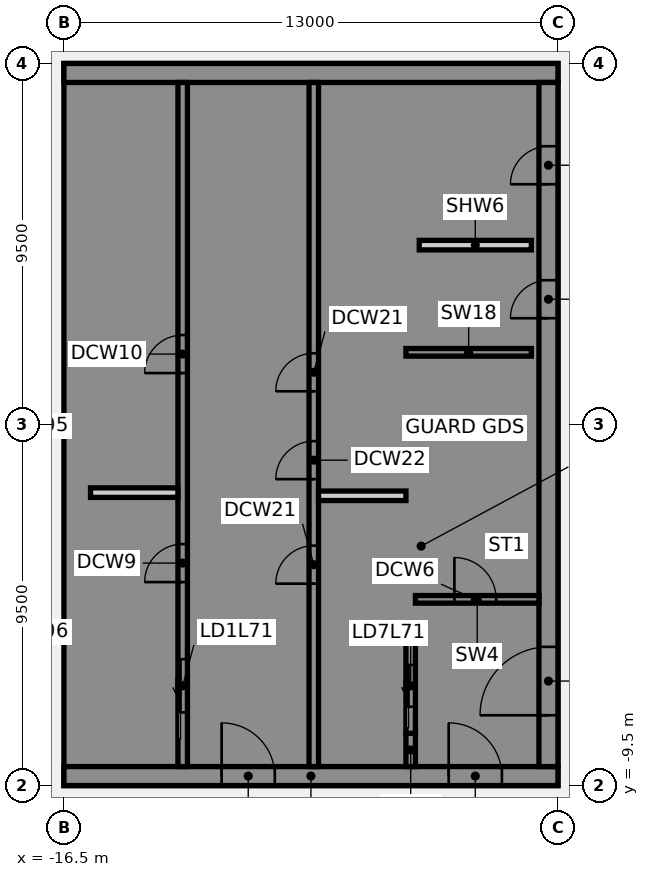
"""IFC4 building model, lengths in metres.
Left out: names, types, materials, properties, quantities, classifications, styles, units other than length and angle.
Written with IfcOpenShell. Run it as: python <this file> out.ifc"""

import sys

from ifc_helpers import new_model, si_unit, direction, frame, frame_2d, origin, place, context, subcontext, project, spatial, polyline, rectangle, outline, extrude, element, fill, save


model = new_model("IFC4")
c1 = context("Model", 3, precision=1e-05, world=origin(), true_north=direction((0.0, 1.0)))
c2 = subcontext(c1, "Body", "Model", "MODEL_VIEW")
j1 = project(units=[si_unit("LENGTHUNIT", "METRE"), si_unit("PLANEANGLEUNIT", "RADIAN")], contexts=[c1])
p1 = place(None, origin())
s1 = spatial("IfcSite", under=j1, at=p1, CompositionType="ELEMENT")
p2 = place(p1, origin())
s2 = spatial("IfcBuilding", under=s1, at=p2, CompositionType="ELEMENT")
p3 = place(p2, frame((0.0, 0.0, 278.4)))
s3 = spatial("IfcBuildingStorey", under=s2, at=p3, CompositionType="ELEMENT", Elevation=278.4)
p4 = place(p3, frame((-16.5, -9.25, 0.0), z_axis=(0.0, 0.0, 1.0), x_axis=(1.0, 0.0, 0.0)))
e1 = element("IfcWall", 1, at=p4, inside=s3, PredefinedType="SHEAR", context=c2, shape_type="SweptSolid", body=[
    extrude(rectangle(XDim=13.0, YDim=0.5, at=frame_2d((6.5, 0.0))), origin(), (0.0, 0.0, 1.0), 8.8),
])
p5 = place(p4, frame((4.15, 0.0, 0.0)))
e2 = element("IfcOpeningElement", 2, at=p5, cuts=e1, PredefinedType="OPENING", context=c2, shape_type="SweptSolid", body=[
    extrude(rectangle(XDim=1.4, YDim=2.1, at=frame_2d((0.7, 1.05))), frame((0.0, 0.26, 0.0), z_axis=(0.0, -1.0, 0.0), x_axis=(1.0, 0.0, 0.0)), (0.0, 0.0, 1.0), 0.52),
])
p6 = place(p4, frame((10.125, 0.0, 0.0)))
e3 = element("IfcOpeningElement", 3, at=p6, cuts=e1, PredefinedType="OPENING", context=c2, shape_type="SweptSolid", body=[
    extrude(rectangle(XDim=1.4, YDim=2.1, at=frame_2d((0.7, 1.05))), frame((0.0, 0.26, 0.0), z_axis=(0.0, -1.0, 0.0), x_axis=(1.0, 0.0, 0.0)), (0.0, 0.0, 1.0), 0.52),
])
p7 = place(p3, origin())
e4 = element("IfcWall", 4, at=p7, inside=s3, PredefinedType="SHEAR", context=c2, shape_type="SweptSolid", body=[
    extrude(outline(polyline([(-13.5, -8.125), (-16.0, -8.125), (-16.0, -5.625), (-13.5, -5.625), (-13.5, -5.375), (-16.0, -5.375), (-16.0, 5.375), (-13.5, 5.375), (-13.5, 5.625), (-16.0, 5.625), (-16.0, 8.125), (-13.5, 8.125), (-13.5, 9.0), (-16.0, 9.0), (-16.5, 9.0), (-16.5, -9.0), (-16.0, -9.0), (-13.5, -9.0), (-13.5, -8.125)])), origin(), (0.0, 0.0, 1.0), 8.8),
])
p8 = place(p3, frame((-16.5, 9.25, 0.0), z_axis=(0.0, 0.0, 1.0), x_axis=(1.0, 0.0, 0.0)))
e5 = element("IfcWall", 5, at=p8, inside=s3, PredefinedType="SHEAR", context=c2, shape_type="SweptSolid", body=[
    extrude(rectangle(XDim=13.0, YDim=0.5, at=frame_2d((6.5, 0.0))), origin(), (0.0, 0.0, 1.0), 8.8),
])
p9 = place(p3, origin())
e6 = element("IfcWall", 6, at=p9, inside=s3, PredefinedType="SHEAR", context=c2, shape_type="SweptSolid", body=[
    extrude(outline(polyline([(-9.8, -5.375), (-9.8, -5.625), (-7.5, -5.625), (-7.25, -5.625), (-7.25, 9.0), (-7.5, 9.0), (-9.8, 9.0), (-9.8, 8.125), (-7.5, 8.125), (-7.5, 5.625), (-9.8, 5.625), (-9.8, 5.375), (-7.5, 5.375), (-7.5, 2.875), (-9.8, 2.875), (-9.8, 2.625), (-7.5, 2.625), (-7.5, -5.375), (-9.8, -5.375)])), origin(), (0.0, 0.0, 1.0), 8.8),
])
p10 = place(p3, origin())
e7 = element("IfcWall", 7, at=p10, inside=s3, PredefinedType="SHEAR", context=c2, shape_type="SweptSolid", body=[
    extrude(outline(polyline([(-7.5, -8.125), (-9.55, -8.125), (-9.55, -5.625), (-9.8, -5.625), (-9.8, -8.125), (-9.8, -9.0), (-7.5, -9.0), (-7.5, -8.125)])), origin(), (0.0, 0.0, 1.0), 8.8),
])
p11 = place(p3, frame((-7.375, -9.0, 0.0), z_axis=(0.0, 0.0, 1.0), x_axis=(0.0, 1.0, 0.0)))
e8 = element("IfcWall", 8, at=p11, inside=s3, PredefinedType="SHEAR", context=c2, shape_type="SweptSolid", body=[
    extrude(rectangle(XDim=0.875, YDim=0.25, at=frame_2d((0.438, 0.0))), origin(), (0.0, 0.0, 1.0), 8.8),
])
p12 = place(p3, frame((-7.5, 1.9, 0.0), z_axis=(0.0, 0.0, 1.0), x_axis=(1.0, 0.0, 0.0)))
e9 = element("IfcWall", 9, at=p12, inside=s3, PredefinedType="SHEAR", context=c2, shape_type="SweptSolid", body=[
    extrude(rectangle(XDim=3.3, YDim=0.2, at=frame_2d((1.65, 0.0))), origin(), (0.0, 0.0, 1.0), 8.8),
])
p13 = place(p3, frame((-13.375, -9.0, 0.0), z_axis=(0.0, 0.0, 1.0), x_axis=(0.0, 1.0, 0.0)))
e10 = element("IfcWall", 10, at=p13, inside=s3, PredefinedType="SHEAR", context=c2, shape_type="SweptSolid", body=[
    extrude(rectangle(XDim=18.0, YDim=0.25, at=frame_2d((9.0, 0.0))), origin(), (0.0, 0.0, 1.0), 8.8),
])
p14 = place(p13, frame((1.425, 0.0, 0.0)))
e11 = element("IfcOpeningElement", 11, at=p14, cuts=e10, PredefinedType="OPENING", context=c2, shape_type="SweptSolid", body=[
    extrude(rectangle(XDim=1.4, YDim=2.1, at=frame_2d((0.7, 1.05))), frame((0.0, 0.135, 0.0), z_axis=(0.0, -1.0, 0.0), x_axis=(1.0, 0.0, 0.0)), (0.0, 0.0, 1.0), 0.27),
])
p15 = place(p13, frame((4.854, 0.0, 0.0)))
e12 = element("IfcOpeningElement", 12, at=p15, cuts=e10, PredefinedType="OPENING", context=c2, shape_type="SweptSolid", body=[
    extrude(rectangle(XDim=1.0, YDim=2.1, at=frame_2d((0.5, 1.05))), frame((0.0, 0.135, 0.0), z_axis=(0.0, -1.0, 0.0), x_axis=(1.0, 0.0, 0.0)), (0.0, 0.0, 1.0), 0.27),
])
p16 = place(p13, frame((10.354, 0.0, 0.0)))
e13 = element("IfcOpeningElement", 13, at=p16, cuts=e10, PredefinedType="OPENING", context=c2, shape_type="SweptSolid", body=[
    extrude(rectangle(XDim=1.0, YDim=2.1, at=frame_2d((0.5, 1.05))), frame((0.0, 0.135, 0.0), z_axis=(0.0, -1.0, 0.0), x_axis=(1.0, 0.0, 0.0)), (0.0, 0.0, 1.0), 0.27),
])
p17 = place(p3, frame((-9.925, -9.0, 0.0), z_axis=(0.0, 0.0, 1.0), x_axis=(0.0, 1.0, 0.0)))
e14 = element("IfcWall", 14, at=p17, inside=s3, PredefinedType="SHEAR", context=c2, shape_type="SweptSolid", body=[
    extrude(rectangle(XDim=18.0, YDim=0.25, at=frame_2d((9.0, 0.0))), origin(), (0.0, 0.0, 1.0), 8.8),
])
p18 = place(p17, frame((4.812, 0.0, 0.0)))
e15 = element("IfcOpeningElement", 15, at=p18, cuts=e14, PredefinedType="OPENING", context=c2, shape_type="SweptSolid", body=[
    extrude(rectangle(XDim=1.0, YDim=2.1, at=frame_2d((0.5, 1.05))), frame((0.0, 0.135, 0.0), z_axis=(0.0, -1.0, 0.0), x_axis=(1.0, 0.0, 0.0)), (0.0, 0.0, 1.0), 0.27),
])
p19 = place(p17, frame((7.562, 0.0, 0.0)))
e16 = element("IfcOpeningElement", 16, at=p19, cuts=e14, PredefinedType="OPENING", context=c2, shape_type="SweptSolid", body=[
    extrude(rectangle(XDim=1.0, YDim=2.1, at=frame_2d((0.5, 1.05))), frame((0.0, 0.135, 0.0), z_axis=(0.0, -1.0, 0.0), x_axis=(1.0, 0.0, 0.0)), (0.0, 0.0, 1.0), 0.27),
])
p20 = place(p17, frame((9.875, 0.0, 0.0)))
e17 = element("IfcOpeningElement", 17, at=p20, cuts=e14, PredefinedType="OPENING", context=c2, shape_type="SweptSolid", body=[
    extrude(rectangle(XDim=1.0, YDim=2.1, at=frame_2d((0.5, 1.05))), frame((0.0, 0.135, 0.0), z_axis=(0.0, -1.0, 0.0), x_axis=(1.0, 0.0, 0.0)), (0.0, 0.0, 1.0), 0.27),
])
p21 = place(p3, frame((-7.375, -8.125, 0.0), z_axis=(0.0, 0.0, 1.0), x_axis=(0.0, 1.0, 0.0)))
e18 = element("IfcWall", 18, at=p21, inside=s3, PredefinedType="SHEAR", context=c2, shape_type="SweptSolid", body=[
    extrude(rectangle(XDim=2.5, YDim=0.25, at=frame_2d((1.25, 0.0))), origin(), (0.0, 0.0, 1.0), 8.8),
])
p22 = place(p21, frame((0.7, 0.0, 0.0)))
e19 = element("IfcOpeningElement", 19, at=p22, cuts=e18, PredefinedType="OPENING", context=c2, shape_type="SweptSolid", body=[
    extrude(rectangle(XDim=1.1, YDim=2.1, at=frame_2d((0.55, 1.05))), frame((0.0, 0.135, 0.0), z_axis=(0.0, -1.0, 0.0), x_axis=(1.0, 0.0, 0.0)), (0.0, 0.0, 1.0), 0.27),
])
p23 = place(p3, frame((-3.75, -9.0, 0.0), z_axis=(0.0, 0.0, 1.0), x_axis=(0.0, 1.0, 0.0)))
e20 = element("IfcWall", 20, at=p23, inside=s3, PredefinedType="SHEAR", context=c2, shape_type="SweptSolid", body=[
    extrude(rectangle(XDim=18.0, YDim=0.5, at=frame_2d((9.0, 0.0))), origin(), (0.0, 0.0, 1.0), 8.8),
])
p24 = place(p23, frame((1.35, 0.0, 0.0)))
e21 = element("IfcOpeningElement", 21, at=p24, cuts=e20, PredefinedType="OPENING", context=c2, shape_type="SweptSolid", body=[
    extrude(rectangle(XDim=1.8, YDim=2.1, at=frame_2d((0.9, 1.05))), frame((0.0, 0.26, 0.0), z_axis=(0.0, -1.0, 0.0), x_axis=(1.0, 0.0, 0.0)), (0.0, 0.0, 1.0), 0.52),
])
p25 = place(p23, frame((11.798, 0.0, 0.0)))
e22 = element("IfcOpeningElement", 22, at=p25, cuts=e20, PredefinedType="OPENING", context=c2, shape_type="SweptSolid", body=[
    extrude(rectangle(XDim=1.0, YDim=2.1, at=frame_2d((0.5, 1.05))), frame((0.0, 0.26, 0.0), z_axis=(0.0, -1.0, 0.0), x_axis=(1.0, 0.0, 0.0)), (0.0, 0.0, 1.0), 0.52),
])
p26 = place(p23, frame((15.323, 0.0, 0.0)))
e23 = element("IfcOpeningElement", 23, at=p26, cuts=e20, PredefinedType="OPENING", context=c2, shape_type="SweptSolid", body=[
    extrude(rectangle(XDim=1.0, YDim=2.1, at=frame_2d((0.5, 1.05))), frame((0.0, 0.26, 0.0), z_axis=(0.0, -1.0, 0.0), x_axis=(1.0, 0.0, 0.0)), (0.0, 0.0, 1.0), 0.52),
])
p27 = place(p3, frame((-7.15, 4.72, 0.0), z_axis=(0.0, 0.0, 1.0), x_axis=(1.0, 0.0, 0.0)))
e24 = element("IfcWall", 24, at=p27, inside=s3, PredefinedType="PARTITIONING", context=c2, shape_type="SweptSolid", body=[
    extrude(rectangle(XDim=2.95, YDim=0.25, at=frame_2d((1.475, 0.0))), origin(), (0.0, 0.0, 1.0), 8.8),
])
p28 = place(p3, frame((-7.25, -4.6, 0.0), z_axis=(0.0, 0.0, 1.0), x_axis=(1.0, 0.0, 0.0)))
e25 = element("IfcWall", 25, at=p28, inside=s3, PredefinedType="SHEAR", context=c2, shape_type="SweptSolid", body=[
    extrude(rectangle(XDim=3.25, YDim=0.2, at=frame_2d((1.625, 0.0))), origin(), (0.0, 0.0, 1.0), 8.8),
])
p29 = place(p28, frame((1.025, 0.0, 0.0)))
e26 = element("IfcOpeningElement", 26, at=p29, cuts=e25, PredefinedType="OPENING", context=c2, shape_type="SweptSolid", body=[
    extrude(rectangle(XDim=1.1, YDim=2.1, at=frame_2d((0.55, 1.05))), frame((0.0, 0.11, 0.0), z_axis=(0.0, -1.0, 0.0), x_axis=(1.0, 0.0, 0.0)), (0.0, 0.0, 1.0), 0.22),
])
for number, where, z_axis, x_axis in (
    (27, (-15.8, -1.792, 0.0), (0.0, 0.0, 1.0), (1.0, 0.0, 0.0)),
    (28, (-9.8, -1.875, 0.0), (0.0, 0.0, 1.0), (1.0, 0.0, 0.0)),
):
    element("IfcWall", number, at=place(p3, frame(where, z_axis=z_axis, x_axis=x_axis)), inside=s3, PredefinedType="PARTITIONING", context=c2, shape_type="SweptSolid", body=[
        extrude(rectangle(XDim=2.3, YDim=0.25, at=frame_2d((1.15, 0.0))), origin(), (0.0, 0.0, 1.0), 8.8),
    ])
p30 = place(p5, origin())
e29 = element("IfcDoor", 29, at=p30, inside=s3, OperationType="SINGLE_SWING_LEFT", PredefinedType="DOOR", context=c2, shape_type="SweptSolid", body=[
    extrude(rectangle(XDim=1.4, YDim=2.1, at=frame_2d((0.7, 1.05))), frame((0.0, 0.025, 0.0), z_axis=(0.0, -1.0, 0.0), x_axis=(1.0, 0.0, 0.0)), (0.0, 0.0, 1.0), 0.05),
])
fill(e2, e29)
p31 = place(p6, origin())
e30 = element("IfcDoor", 30, at=p31, inside=s3, OperationType="SINGLE_SWING_LEFT", PredefinedType="DOOR", context=c2, shape_type="SweptSolid", body=[
    extrude(rectangle(XDim=1.4, YDim=2.1, at=frame_2d((0.7, 1.05))), frame((0.0, 0.025, 0.0), z_axis=(0.0, -1.0, 0.0), x_axis=(1.0, 0.0, 0.0)), (0.0, 0.0, 1.0), 0.05),
])
fill(e3, e30)
p32 = place(p24, origin())
e31 = element("IfcDoor", 31, at=p32, inside=s3, OperationType="SINGLE_SWING_LEFT", PredefinedType="DOOR", context=c2, shape_type="SweptSolid", body=[
    extrude(rectangle(XDim=1.8, YDim=2.1, at=frame_2d((0.9, 1.05))), frame((0.0, 0.025, 0.0), z_axis=(0.0, -1.0, 0.0), x_axis=(1.0, 0.0, 0.0)), (0.0, 0.0, 1.0), 0.05),
])
fill(e21, e31)
p33 = place(p25, origin())
e32 = element("IfcDoor", 32, at=p33, inside=s3, OperationType="SINGLE_SWING_LEFT", PredefinedType="DOOR", context=c2, shape_type="SweptSolid", body=[
    extrude(rectangle(XDim=1.0, YDim=2.1, at=frame_2d((0.5, 1.05))), frame((0.0, 0.225, 0.0), z_axis=(0.0, -1.0, 0.0), x_axis=(1.0, 0.0, 0.0)), (0.0, 0.0, 1.0), 0.05),
])
fill(e22, e32)
p34 = place(p26, origin())
e33 = element("IfcDoor", 33, at=p34, inside=s3, OperationType="SINGLE_SWING_LEFT", PredefinedType="DOOR", context=c2, shape_type="SweptSolid", body=[
    extrude(rectangle(XDim=1.0, YDim=2.1, at=frame_2d((0.5, 1.05))), frame((0.0, 0.225, 0.0), z_axis=(0.0, -1.0, 0.0), x_axis=(1.0, 0.0, 0.0)), (0.0, 0.0, 1.0), 0.05),
])
fill(e23, e33)
p35 = place(p29, origin())
e34 = element("IfcDoor", 34, at=p35, inside=s3, OperationType="SINGLE_SWING_LEFT", PredefinedType="DOOR", context=c2, shape_type="SweptSolid", body=[
    extrude(rectangle(XDim=1.1, YDim=2.1, at=frame_2d((0.55, 1.05))), frame((0.0, 0.025, 0.0), z_axis=(0.0, -1.0, 0.0), x_axis=(1.0, 0.0, 0.0)), (0.0, 0.0, 1.0), 0.05),
])
fill(e26, e34)
p36 = place(p14, origin())
e35 = element("IfcDoor", 35, at=p36, inside=s3, OperationType="SLIDING_TO_LEFT", PredefinedType="DOOR", context=c2, shape_type="SweptSolid", body=[
    extrude(rectangle(XDim=1.4, YDim=2.1, at=frame_2d((0.7, 1.05))), frame((0.0, 0.025, 0.0), z_axis=(0.0, -1.0, 0.0), x_axis=(1.0, 0.0, 0.0)), (0.0, 0.0, 1.0), 0.05),
])
fill(e11, e35)
p37 = place(p22, origin())
e36 = element("IfcDoor", 36, at=p37, inside=s3, OperationType="SLIDING_TO_LEFT", PredefinedType="DOOR", context=c2, shape_type="SweptSolid", body=[
    extrude(rectangle(XDim=1.1, YDim=2.1, at=frame_2d((0.55, 1.05))), frame((0.0, 0.025, 0.0), z_axis=(0.0, -1.0, 0.0), x_axis=(1.0, 0.0, 0.0)), (0.0, 0.0, 1.0), 0.05),
])
fill(e19, e36)
p38 = place(p15, origin())
e37 = element("IfcDoor", 37, at=p38, inside=s3, OperationType="SINGLE_SWING_LEFT", PredefinedType="DOOR", context=c2, shape_type="SweptSolid", body=[
    extrude(rectangle(XDim=1.0, YDim=2.1, at=frame_2d((0.5, 1.05))), frame((0.0, 0.025, 0.0), z_axis=(0.0, -1.0, 0.0), x_axis=(1.0, 0.0, 0.0)), (0.0, 0.0, 1.0), 0.05),
])
fill(e12, e37)
p39 = place(p16, origin())
e38 = element("IfcDoor", 38, at=p39, inside=s3, OperationType="SINGLE_SWING_LEFT", PredefinedType="DOOR", context=c2, shape_type="SweptSolid", body=[
    extrude(rectangle(XDim=1.0, YDim=2.1, at=frame_2d((0.5, 1.05))), frame((0.0, 0.025, 0.0), z_axis=(0.0, -1.0, 0.0), x_axis=(1.0, 0.0, 0.0)), (0.0, 0.0, 1.0), 0.05),
])
fill(e13, e38)
p40 = place(p18, origin())
e39 = element("IfcDoor", 39, at=p40, inside=s3, OperationType="SINGLE_SWING_LEFT", PredefinedType="DOOR", context=c2, shape_type="SweptSolid", body=[
    extrude(rectangle(XDim=1.0, YDim=2.1, at=frame_2d((0.5, 1.05))), frame((0.0, 0.025, 0.0), z_axis=(0.0, -1.0, 0.0), x_axis=(1.0, 0.0, 0.0)), (0.0, 0.0, 1.0), 0.05),
])
fill(e15, e39)
p41 = place(p19, origin())
e40 = element("IfcDoor", 40, at=p41, inside=s3, OperationType="SINGLE_SWING_LEFT", PredefinedType="DOOR", context=c2, shape_type="SweptSolid", body=[
    extrude(rectangle(XDim=1.0, YDim=2.1, at=frame_2d((0.5, 1.05))), frame((0.0, 0.025, 0.0), z_axis=(0.0, -1.0, 0.0), x_axis=(1.0, 0.0, 0.0)), (0.0, 0.0, 1.0), 0.05),
])
fill(e16, e40)
p42 = place(p20, origin())
e41 = element("IfcDoor", 41, at=p42, inside=s3, OperationType="SINGLE_SWING_LEFT", PredefinedType="DOOR", context=c2, shape_type="SweptSolid", body=[
    extrude(rectangle(XDim=1.0, YDim=2.1, at=frame_2d((0.5, 1.05))), frame((0.0, 0.025, 0.0), z_axis=(0.0, -1.0, 0.0), x_axis=(1.0, 0.0, 0.0)), (0.0, 0.0, 1.0), 0.05),
])
fill(e17, e41)
save(model, sys.argv[1])
